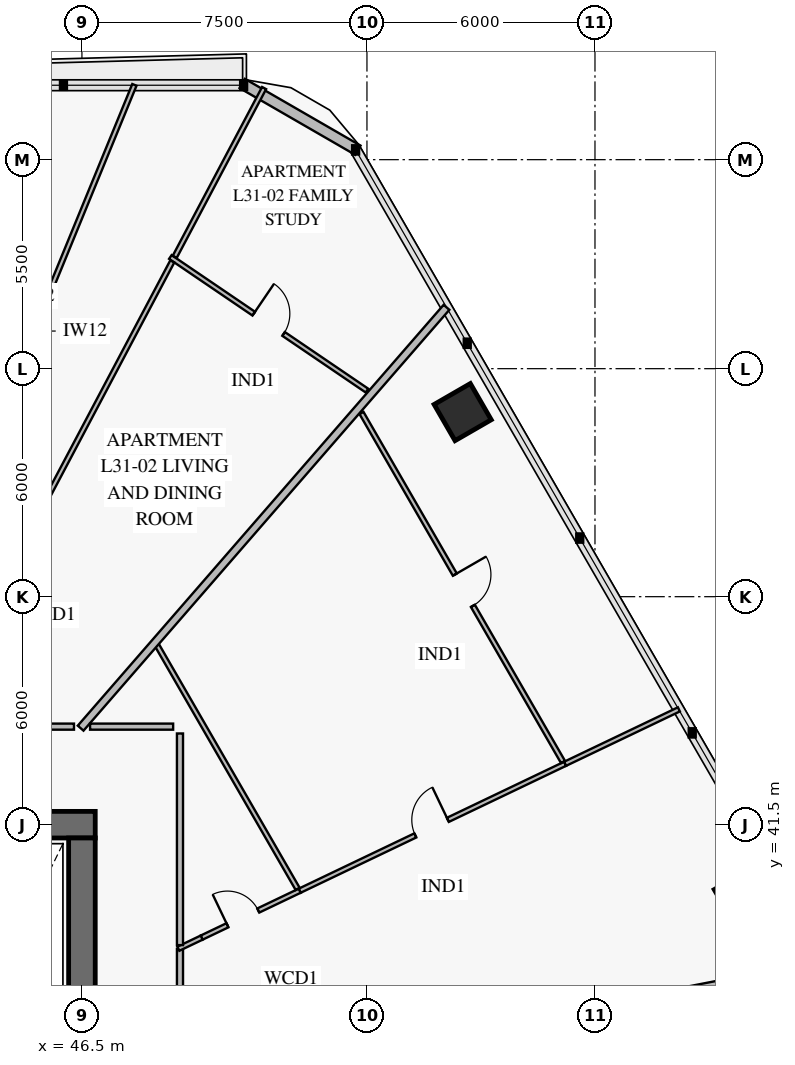
"""IFC4 building model, lengths in metres.
Left out: names, types, materials, properties, quantities, classifications, styles, units other than length and angle.
Written with IfcOpenShell. Run it as: python <this file> out.ifc"""

import sys

from ifc_helpers import new_model, si_unit, direction, frame, frame_2d, origin, origin_2d, place, context, subcontext, project, spatial, rectangle, extrude, element, fill, save


model = new_model("IFC4")
c1 = context("Model", 3, precision=1e-05, world=origin(), true_north=direction((0.0, 1.0)))
c2 = subcontext(c1, "Body", "Model", "MODEL_VIEW")
j1 = project(units=[si_unit("LENGTHUNIT", "METRE"), si_unit("PLANEANGLEUNIT", "RADIAN")], contexts=[c1])
p1 = place(None, origin())
s1 = spatial("IfcSite", under=j1, at=p1, CompositionType="ELEMENT")
p2 = place(p1, origin())
s2 = spatial("IfcBuilding", under=s1, at=p2, CompositionType="ELEMENT")
p3 = place(p2, frame((0.0, 0.0, 126.6)))
s3 = spatial("IfcBuildingStorey", under=s2, at=p3, CompositionType="ELEMENT", Elevation=126.6)
p4 = place(p3, frame((46.85, 41.5, 0.0), z_axis=(0.0, 0.0, 1.0), x_axis=(-1.0, 0.0, 0.0)))
e1 = element("IfcWall", 1, at=p4, inside=s3, PredefinedType="SHEAR", context=c2, shape_type="SweptSolid", body=[
    extrude(rectangle(XDim=7.9, YDim=0.7, at=frame_2d((3.95, 0.0))), origin(), (0.0, 0.0, 1.0), 3.8),
])
p5 = place(p3, frame((46.5, 22.85, 0.0), z_axis=(0.0, 0.0, 1.0), x_axis=(0.0, 1.0, 0.0)))
e2 = element("IfcWall", 2, at=p5, inside=s3, PredefinedType="SHEAR", context=c2, shape_type="SweptSolid", body=[
    extrude(rectangle(XDim=18.3, YDim=0.7, at=frame_2d((9.15, 0.0))), origin(), (0.0, 0.0, 1.0), 3.8),
])
p6 = place(p5, frame((8.9, 0.0, 0.0)))
e3 = element("IfcOpeningElement", 3, at=p6, cuts=e2, PredefinedType="OPENING", context=c2, shape_type="SweptSolid", body=[
    extrude(rectangle(XDim=1.1, YDim=2.15, at=frame_2d((0.55, 1.075))), frame((0.0, 0.362, 0.0), z_axis=(0.0, -1.0, 0.0), x_axis=(1.0, 0.0, 0.0)), (0.0, 0.0, 1.0), 0.724),
])
for number, where, z_axis, x_axis in (
    (4, (63.889, 39.592, 0.0), (0.0, 0.0, 1.0), (-0.5, 0.866, 0.0)),
    (5, (56.519, 52.357, 0.0), (0.0, 0.0, 1.0), (-0.5, 0.866, 0.0)),
):
    element("IfcColumn", number, at=place(p3, frame(where, z_axis=z_axis, x_axis=x_axis)), inside=s3, PredefinedType="COLUMN", context=c2, shape_type="SweptSolid", body=[
        extrude(rectangle(XDim=1.1, YDim=1.1, at=origin_2d()), origin(), (0.0, 0.0, 1.0), 3.55),
    ])
p7 = place(p3, frame((50.717, 61.006, 0.0), z_axis=(0.0, 0.0, 1.0), x_axis=(0.866007452331, -0.500031091541, 0.0)))
e6 = element("IfcWall", 6, at=p7, inside=s3, PredefinedType="SOLIDWALL", context=c2, shape_type="SweptSolid", body=[
    extrude(rectangle(XDim=3.515, YDim=0.28, at=frame_2d((1.757, 0.0))), origin(), (0.0, 0.0, 1.0), 3.55),
])
p8 = place(p3, frame((49.65, 38.528, 0.0), z_axis=(0.0, 0.0, 1.0), x_axis=(0.902135664901, 0.431452479555, 0.0)))
e7 = element("IfcWall", 7, at=p8, inside=s3, PredefinedType="PARTITIONING", context=c2, shape_type="SweptSolid", body=[
    extrude(rectangle(XDim=2.863, YDim=0.12, at=frame_2d((1.431, 0.0))), origin(), (0.0, 0.0, 1.0), 3.55),
])
p9 = place(p8, frame((0.752, 0.0, 0.0)))
e8 = element("IfcOpeningElement", 8, at=p9, cuts=e7, PredefinedType="OPENING", context=c2, shape_type="SweptSolid", body=[
    extrude(rectangle(XDim=0.9, YDim=2.1, at=frame_2d((0.45, 1.05))), frame((0.0, 0.072, 0.0), z_axis=(0.0, -1.0, 0.0), x_axis=(1.0, 0.0, 0.0)), (0.0, 0.0, 1.0), 0.144),
])
p10 = place(p3, frame((52.232, 39.763, 0.0), z_axis=(0.0, 0.0, 1.0), x_axis=(0.902143295933, 0.43143652326, 0.0)))
e9 = element("IfcWall", 9, at=p10, inside=s3, PredefinedType="PARTITIONING", context=c2, shape_type="SweptSolid", body=[
    extrude(rectangle(XDim=7.74, YDim=0.12, at=frame_2d((3.87, 0.0))), origin(), (0.0, 0.0, 1.0), 3.1),
])
p11 = place(p10, frame((3.37, 0.0, 0.0)))
e10 = element("IfcOpeningElement", 10, at=p11, cuts=e9, PredefinedType="OPENING", context=c2, shape_type="SweptSolid", body=[
    extrude(rectangle(XDim=0.95, YDim=2.1, at=frame_2d((0.475, 1.05))), frame((0.0, 0.072, 0.0), z_axis=(0.0, -1.0, 0.0), x_axis=(1.0, 0.0, 0.0)), (0.0, 0.0, 1.0), 0.144),
])
p12 = place(p3, frame((59.158, 43.151, 0.0), z_axis=(0.0, 0.0, 1.0), x_axis=(-0.500002146898, 0.866024164269, 0.0)))
e11 = element("IfcWall", 11, at=p12, inside=s3, PredefinedType="PARTITIONING", context=c2, shape_type="SweptSolid", body=[
    extrude(rectangle(XDim=10.604, YDim=0.12, at=frame_2d((5.302, 0.0))), origin(), (0.0, 0.0, 1.0), 2.85),
])
p13 = place(p12, frame((4.742, 0.0, 0.0)))
e12 = element("IfcOpeningElement", 12, at=p13, cuts=e11, PredefinedType="OPENING", context=c2, shape_type="SweptSolid", body=[
    extrude(rectangle(XDim=0.95, YDim=2.1, at=frame_2d((0.475, 1.05))), frame((0.0, 0.072, 0.0), z_axis=(0.0, -1.0, 0.0), x_axis=(1.0, 0.0, 0.0)), (0.0, 0.0, 1.0), 0.144),
])
p14 = place(p3, frame((49.08, 34.682, 0.0), z_axis=(0.0, 0.0, 1.0), x_axis=(0.0, 1.0, 0.0)))
e13 = element("IfcWall", 13, at=p14, inside=s3, PredefinedType="PARTITIONING", context=c2, shape_type="SweptSolid", body=[
    extrude(rectangle(XDim=3.552, YDim=0.16, at=frame_2d((1.776, 0.0))), origin(), (0.0, 0.0, 1.0), 2.85),
])
p15 = place(p14, frame((1.251, 0.0, 0.0)))
e14 = element("IfcOpeningElement", 14, at=p15, cuts=e13, PredefinedType="OPENING", context=c2, shape_type="SweptSolid", body=[
    extrude(rectangle(XDim=1.05, YDim=2.15, at=frame_2d((0.525, 1.075))), frame((0.0, 0.092, 0.0), z_axis=(0.0, -1.0, 0.0), x_axis=(1.0, 0.0, 0.0)), (0.0, 0.0, 1.0), 0.184),
])
p16 = place(p3, frame((54.001, 52.923, 0.0), z_axis=(0.0, 0.0, 1.0), x_axis=(-0.827088330425, 0.562071964854, 0.0)))
e15 = element("IfcWall", 15, at=p16, inside=s3, PredefinedType="PARTITIONING", context=c2, shape_type="SweptSolid", body=[
    extrude(rectangle(XDim=6.256, YDim=0.12, at=frame_2d((3.128, 0.0))), origin(), (0.0, 0.0, 1.0), 3.55),
])
p17 = place(p16, frame((2.653, 0.0, 0.0)))
e16 = element("IfcOpeningElement", 16, at=p17, cuts=e15, PredefinedType="OPENING", context=c2, shape_type="SweptSolid", body=[
    extrude(rectangle(XDim=0.95, YDim=2.1, at=frame_2d((0.475, 1.05))), frame((0.0, 0.072, 0.0), z_axis=(0.0, -1.0, 0.0), x_axis=(1.0, 0.0, 0.0)), (0.0, 0.0, 1.0), 0.144),
])
p18 = place(p3, frame((46.291, 44.08, 0.0), z_axis=(0.0, 0.0, 1.0), x_axis=(-1.0, 0.0, 0.0)))
e17 = element("IfcWall", 17, at=p18, inside=s3, PredefinedType="PARTITIONING", context=c2, shape_type="SweptSolid", body=[
    extrude(rectangle(XDim=3.872, YDim=0.16, at=frame_2d((1.936, 0.0))), origin(), (0.0, 0.0, 1.0), 3.55),
])
p19 = place(p18, frame((1.411, 0.0, 0.0)))
e18 = element("IfcOpeningElement", 18, at=p19, cuts=e17, PredefinedType="OPENING", context=c2, shape_type="SweptSolid", body=[
    extrude(rectangle(XDim=1.05, YDim=2.15, at=frame_2d((0.525, 1.075))), frame((0.0, 0.092, 0.0), z_axis=(0.0, -1.0, 0.0), x_axis=(1.0, 0.0, 0.0)), (0.0, 0.0, 1.0), 0.184),
])
p20 = place(p3, frame((49.04, 34.535, 0.0), z_axis=(0.0, 0.0, 1.0), x_axis=(0.981625938162, 0.190815401706, 0.0)))
e19 = element("IfcWall", 19, at=p20, inside=s3, PredefinedType="PARTITIONING", context=c2, shape_type="SweptSolid", body=[
    extrude(rectangle(XDim=17.343, YDim=0.2, at=frame_2d((8.671, 0.0))), origin(), (0.0, 0.0, 1.0), 2.8),
])
p21 = place(p3, frame((49.038, 38.235, 0.0), z_axis=(0.0, 0.0, 1.0), x_axis=(0.902061167318, 0.431608214028, 0.0)))
e20 = element("IfcWall", 20, at=p21, inside=s3, PredefinedType="PARTITIONING", context=c2, shape_type="SweptSolid", body=[
    extrude(rectangle(XDim=0.679, YDim=0.12, at=frame_2d((0.339, 0.0))), origin(), (0.0, 0.0, 1.0), 3.55),
])
p22 = place(p3, frame((59.215, 43.103, 0.0), z_axis=(0.0, 0.0, 1.0), x_axis=(0.902135467198, 0.431452892936, 0.0)))
e21 = element("IfcWall", 21, at=p22, inside=s3, PredefinedType="PARTITIONING", context=c2, shape_type="SweptSolid", body=[
    extrude(rectangle(XDim=3.317, YDim=0.12, at=frame_2d((1.659, 0.0))), origin(), (0.0, 0.0, 1.0), 2.8),
])
p23 = place(p3, frame((52.176, 39.812, 0.0), z_axis=(0.0, 0.0, 1.0), x_axis=(-0.499998637326, 0.866026190523, 0.0)))
e22 = element("IfcWall", 22, at=p23, inside=s3, PredefinedType="PARTITIONING", context=c2, shape_type="SweptSolid", body=[
    extrude(rectangle(XDim=7.422, YDim=0.12, at=frame_2d((3.711, 0.0))), origin(), (0.0, 0.0, 1.0), 2.85),
])
p24 = place(p3, frame((46.466, 44.04, 0.0), z_axis=(0.0, 0.0, 1.0), x_axis=(0.656061723069, 0.754707238287, 0.0)))
e23 = element("IfcWall", 23, at=p24, inside=s3, PredefinedType="PARTITIONING", context=c2, shape_type="SweptSolid", body=[
    extrude(rectangle(XDim=14.674, YDim=0.2, at=frame_2d((7.337, 0.0))), origin(), (0.0, 0.0, 1.0), 2.8),
])
p25 = place(p3, frame((42.567, 48.011, 0.0), z_axis=(0.0, 0.0, 1.0), x_axis=(0.379443868759, 0.925214759103, 0.0)))
e24 = element("IfcWall", 24, at=p25, inside=s3, PredefinedType="PARTITIONING", context=c2, shape_type="SweptSolid", body=[
    extrude(rectangle(XDim=14.005, YDim=0.12, at=frame_2d((7.002, 0.0))), origin(), (0.0, 0.0, 1.0), 2.8),
])
p26 = place(p3, frame((44.216, 47.517, 0.0), z_axis=(0.0, 0.0, 1.0), x_axis=(0.467901230601, 0.883780763765, 0.0)))
e25 = element("IfcWall", 25, at=p26, inside=s3, PredefinedType="PARTITIONING", context=c2, shape_type="SweptSolid", body=[
    extrude(rectangle(XDim=9.963, YDim=0.12, at=frame_2d((4.982, 0.0))), origin(), (0.0, 0.0, 1.0), 3.1),
])
p27 = place(p3, frame((48.942, 56.443, 0.0), z_axis=(0.0, 0.0, 1.0), x_axis=(0.467903344083, 0.883779644819, 0.0)))
e26 = element("IfcWall", 26, at=p27, inside=s3, PredefinedType="PARTITIONING", context=c2, shape_type="SweptSolid", body=[
    extrude(rectangle(XDim=5.026, YDim=0.12, at=frame_2d((2.513, 0.0))), origin(), (0.0, 0.0, 1.0), 2.8),
])
p28 = place(p3, frame((49.08, 38.331, 0.0), z_axis=(0.0, 0.0, 1.0), x_axis=(0.0, 1.0, 0.0)))
e27 = element("IfcWall", 27, at=p28, inside=s3, PredefinedType="PARTITIONING", context=c2, shape_type="SweptSolid", body=[
    extrude(rectangle(XDim=5.569, YDim=0.16, at=frame_2d((2.784, 0.0))), origin(), (0.0, 0.0, 1.0), 3.55),
])
p29 = place(p3, frame((48.9, 44.08, 0.0), z_axis=(0.0, 0.0, 1.0), x_axis=(-1.0, 0.0, 0.0)))
e28 = element("IfcWall", 28, at=p29, inside=s3, PredefinedType="PARTITIONING", context=c2, shape_type="SweptSolid", body=[
    extrude(rectangle(XDim=2.186, YDim=0.16, at=frame_2d((1.093, 0.0))), origin(), (0.0, 0.0, 1.0), 2.85),
])
p30 = place(p9, origin())
e29 = element("IfcDoor", 29, at=p30, inside=s3, OperationType="SINGLE_SWING_LEFT", PredefinedType="DOOR", context=c2, shape_type="SweptSolid", body=[
    extrude(rectangle(XDim=0.9, YDim=2.1, at=frame_2d((0.45, 1.05))), frame((0.0, 0.025, 0.0), z_axis=(0.0, -1.0, 0.0), x_axis=(1.0, 0.0, 0.0)), (0.0, 0.0, 1.0), 0.05),
])
fill(e8, e29)
p31 = place(p11, origin())
e30 = element("IfcDoor", 30, at=p31, inside=s3, OperationType="SINGLE_SWING_RIGHT", PredefinedType="DOOR", context=c2, shape_type="SweptSolid", body=[
    extrude(rectangle(XDim=0.95, YDim=2.1, at=frame_2d((0.475, 1.05))), frame((0.0, 0.025, 0.0), z_axis=(0.0, -1.0, 0.0), x_axis=(1.0, 0.0, 0.0)), (0.0, 0.0, 1.0), 0.05),
])
fill(e10, e30)
p32 = place(p13, frame((0.95, 0.0, 0.0), z_axis=(0.0, 0.0, 1.0), x_axis=(-1.0, 0.0, 0.0)))
e31 = element("IfcDoor", 31, at=p32, inside=s3, OperationType="SINGLE_SWING_LEFT", PredefinedType="DOOR", context=c2, shape_type="SweptSolid", body=[
    extrude(rectangle(XDim=0.95, YDim=2.1, at=frame_2d((0.475, 1.05))), frame((0.0, 0.025, 0.0), z_axis=(0.0, -1.0, 0.0), x_axis=(1.0, 0.0, 0.0)), (0.0, 0.0, 1.0), 0.05),
])
fill(e12, e31)
p33 = place(p17, frame((0.95, 0.0, 0.0), z_axis=(0.0, 0.0, 1.0), x_axis=(-1.0, 0.0, 0.0)))
e32 = element("IfcDoor", 32, at=p33, inside=s3, OperationType="SINGLE_SWING_LEFT", PredefinedType="DOOR", context=c2, shape_type="SweptSolid", body=[
    extrude(rectangle(XDim=0.95, YDim=2.1, at=frame_2d((0.475, 1.05))), frame((0.0, 0.025, 0.0), z_axis=(0.0, -1.0, 0.0), x_axis=(1.0, 0.0, 0.0)), (0.0, 0.0, 1.0), 0.05),
])
fill(e16, e32)
save(model, sys.argv[1])
